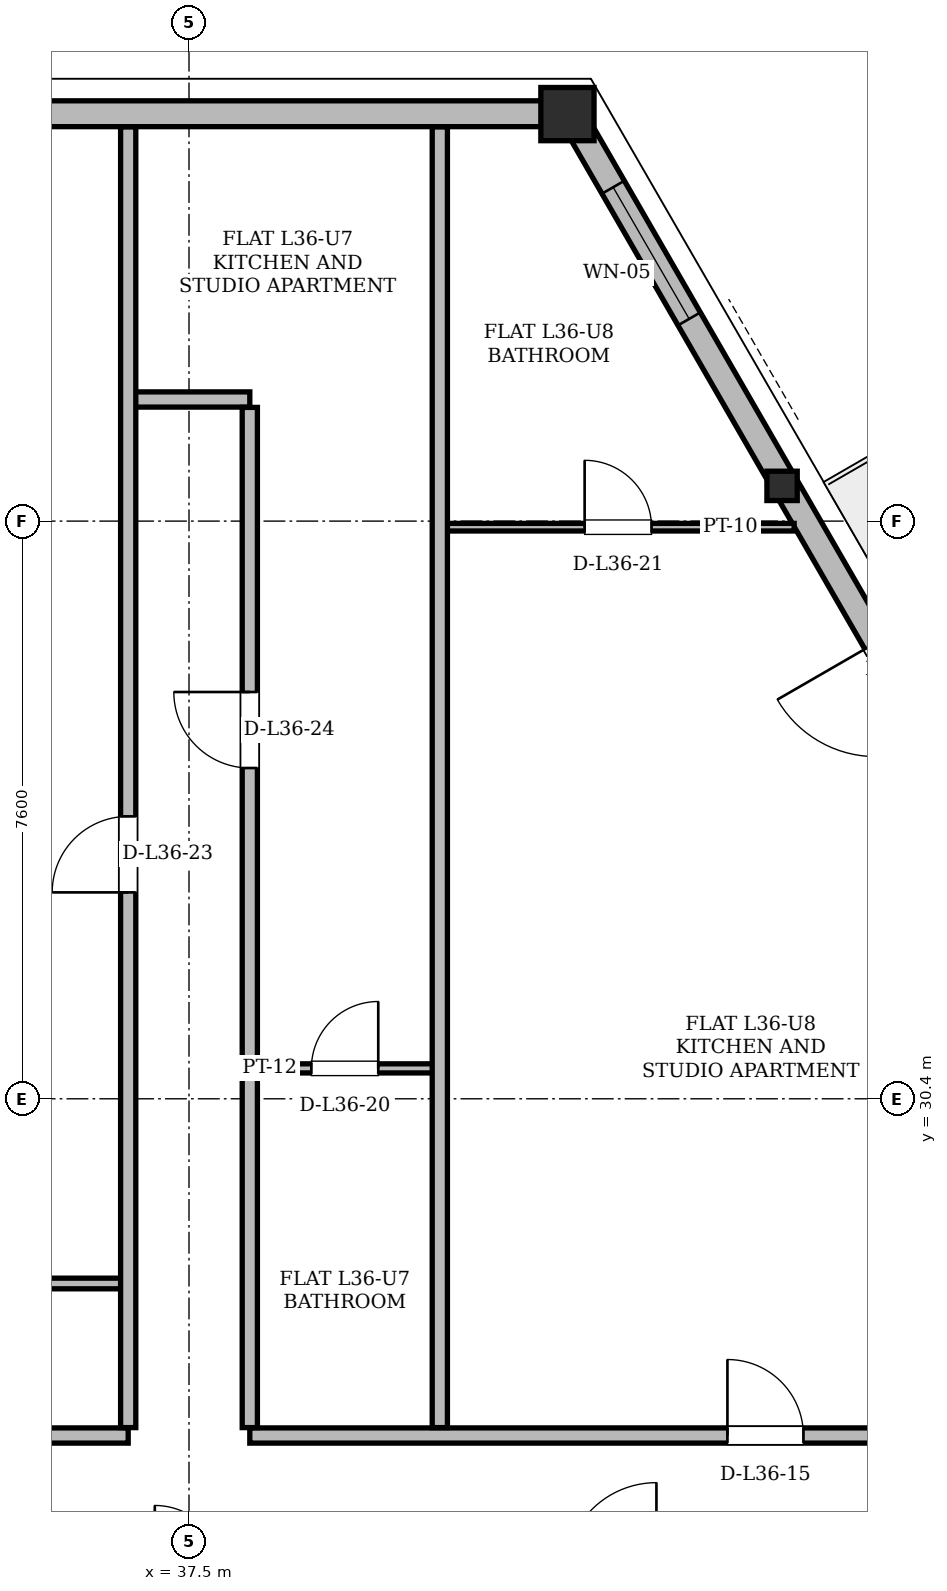
"""IFC4 building model, lengths in metres.
Left out: names, types, materials, properties, quantities, classifications, styles, units other than length and angle.
Written with IfcOpenShell. Run it as: python <this file> out.ifc"""

import sys

from ifc_helpers import new_model, si_unit, direction, frame, frame_2d, origin, origin_2d, place, context, subcontext, project, spatial, rectangle, hollow_rectangle, i_section, extrude, element, fill, save


model = new_model("IFC4")
c1 = context("Model", 3, precision=1e-05, world=origin(), true_north=direction((0.0, 1.0)))
c2 = subcontext(c1, "Body", "Model", "MODEL_VIEW")
j1 = project(units=[si_unit("LENGTHUNIT", "METRE"), si_unit("PLANEANGLEUNIT", "RADIAN")], contexts=[c1])
p1 = place(None, origin())
s1 = spatial("IfcSite", under=j1, at=p1, CompositionType="ELEMENT")
p2 = place(p1, origin())
s2 = spatial("IfcBuilding", under=s1, at=p2, CompositionType="ELEMENT")
p3 = place(p2, frame((0.0, 0.0, 138.6)))
s3 = spatial("IfcBuildingStorey", under=s2, at=p3, CompositionType="ELEMENT", Elevation=138.6)
p4 = place(p3, frame((42.522, 43.36, 0.004), z_axis=(-0.02405984636, -0.00265066104, 0.999707005972), x_axis=(0.109506935686, -0.99398603161, 0.0)))
e1 = element("IfcColumn", 1, at=p4, inside=s3, PredefinedType="COLUMN", context=c2, shape_type="SweptSolid", body=[
    extrude(hollow_rectangle(XDim=0.7, YDim=0.7, WallThickness=0.055, at=origin_2d()), origin(), (0.0, 0.0, 1.0), 3.592),
])
p5 = place(p3, frame((45.344, 38.473, 0.004), z_axis=(-0.022497217559, -0.005301459123, 0.999732849182), x_axis=(0.229367125794, -0.973339982537, 0.0)))
e2 = element("IfcColumn", 2, at=p5, inside=s3, PredefinedType="COLUMN", context=c2, shape_type="SweptSolid", body=[
    extrude(i_section(OverallWidth=0.399, OverallDepth=0.386, WebThickness=0.021, FlangeThickness=0.033, at=origin_2d()), origin(), (0.0, 0.0, 1.0), 3.592),
])
p6 = place(p3, frame((60.155, 12.82, 0.0), z_axis=(0.0, 0.0, 1.0), x_axis=(-0.499998325337, 0.86602637065, 0.0)))
e3 = element("IfcWall", 3, at=p6, inside=s3, PredefinedType="SOLIDWALL", context=c2, shape_type="SweptSolid", body=[
    extrude(rectangle(XDim=35.264, YDim=0.34, at=frame_2d((17.632, 0.0))), origin(), (0.0, 0.0, 1.0), 2.58),
])
p7 = place(p6, frame((6.579, 0.0, 0.0)))
e4 = element("IfcOpeningElement", 4, at=p7, cuts=e3, PredefinedType="OPENING", context=c2, shape_type="SweptSolid", body=[
    extrude(rectangle(XDim=1.5, YDim=2.2, at=frame_2d((0.75, 1.1))), frame((0.0, 0.17, 0.0), z_axis=(0.0, -1.0, 0.0), x_axis=(1.0, 0.0, 0.0)), (0.0, 0.0, 1.0), 0.34),
])
p8 = place(p6, frame((25.73, 0.0, 0.0)))
e5 = element("IfcOpeningElement", 5, at=p8, cuts=e3, PredefinedType="OPENING", context=c2, shape_type="SweptSolid", body=[
    extrude(rectangle(XDim=1.5, YDim=2.2, at=frame_2d((0.75, 1.1))), frame((0.0, 0.17, 0.0), z_axis=(0.0, -1.0, 0.0), x_axis=(1.0, 0.0, 0.0)), (0.0, 0.0, 1.0), 0.34),
])
p9 = place(p6, frame((3.541, 0.0, 0.85)))
e6 = element("IfcOpeningElement", 6, at=p9, cuts=e3, PredefinedType="OPENING", context=c2, shape_type="SweptSolid", body=[
    extrude(rectangle(XDim=1.2, YDim=1.48, at=frame_2d((0.6, 0.74))), frame((0.0, 0.17, 0.0), z_axis=(0.0, -1.0, 0.0), x_axis=(1.0, 0.0, 0.0)), (0.0, 0.0, 1.0), 0.34),
])
p10 = place(p6, frame((11.719, 0.0, 0.85)))
e7 = element("IfcOpeningElement", 7, at=p10, cuts=e3, PredefinedType="OPENING", context=c2, shape_type="SweptSolid", body=[
    extrude(rectangle(XDim=1.2, YDim=1.48, at=frame_2d((0.6, 0.74))), frame((0.0, 0.17, 0.0), z_axis=(0.0, -1.0, 0.0), x_axis=(1.0, 0.0, 0.0)), (0.0, 0.0, 1.0), 0.34),
])
p11 = place(p6, frame((15.189, 0.0, 0.85)))
e8 = element("IfcOpeningElement", 8, at=p11, cuts=e3, PredefinedType="OPENING", context=c2, shape_type="SweptSolid", body=[
    extrude(rectangle(XDim=2.8, YDim=1.62, at=frame_2d((1.4, 0.81))), frame((0.0, 0.17, 0.0), z_axis=(0.0, -1.0, 0.0), x_axis=(1.0, 0.0, 0.0)), (0.0, 0.0, 1.0), 0.34),
])
p12 = place(p6, frame((32.147, 0.0, 0.85)))
e9 = element("IfcOpeningElement", 9, at=p12, cuts=e3, PredefinedType="OPENING", context=c2, shape_type="SweptSolid", body=[
    extrude(rectangle(XDim=2.0, YDim=1.62, at=frame_2d((1.0, 0.81))), frame((0.0, 0.17, 0.0), z_axis=(0.0, -1.0, 0.0), x_axis=(1.0, 0.0, 0.0)), (0.0, 0.0, 1.0), 0.34),
])
p13 = place(p3, frame((42.522, 43.36, 0.0), z_axis=(0.0, 0.0, 1.0), x_axis=(-1.0, 0.0, 0.0)))
e10 = element("IfcWall", 10, at=p13, inside=s3, PredefinedType="SOLIDWALL", context=c2, shape_type="SweptSolid", body=[
    extrude(rectangle(XDim=10.045, YDim=0.34, at=frame_2d((5.022, 0.0))), origin(), (0.0, 0.0, 1.0), 2.58),
])
p14 = place(p3, frame((27.55, 25.97, 0.0), z_axis=(0.0, 0.0, 1.0), x_axis=(1.0, 0.0, 0.0)))
e11 = element("IfcWall", 11, at=p14, inside=s3, PredefinedType="PARTITIONING", context=c2, shape_type="SweptSolid", body=[
    extrude(rectangle(XDim=9.15, YDim=0.2, at=frame_2d((4.575, 0.0))), origin(), (0.0, 0.0, 1.0), 2.822),
])
p15 = place(p3, frame((38.3, 25.97, 0.0), z_axis=(0.0, 0.0, 1.0), x_axis=(1.0, 0.0, 0.0)))
e12 = element("IfcWall", 12, at=p15, inside=s3, PredefinedType="PARTITIONING", context=c2, shape_type="SweptSolid", body=[
    extrude(rectangle(XDim=11.7, YDim=0.2, at=frame_2d((5.85, 0.0))), origin(), (0.0, 0.0, 1.0), 2.822),
])
p16 = place(p15, frame((6.284, 0.0, 0.0)))
e13 = element("IfcOpeningElement", 13, at=p16, cuts=e12, PredefinedType="OPENING", context=c2, shape_type="SweptSolid", body=[
    extrude(rectangle(XDim=1.0, YDim=2.18, at=frame_2d((0.5, 1.09))), frame((0.0, 0.1, 0.0), z_axis=(0.0, -1.0, 0.0), x_axis=(1.0, 0.0, 0.0)), (0.0, 0.0, 1.0), 0.2),
])
p17 = place(p3, frame((23.793, 27.97, 0.0), z_axis=(0.0, 0.0, 1.0), x_axis=(1.0, 0.0, 0.0)))
e14 = element("IfcWall", 14, at=p17, inside=s3, PredefinedType="PARTITIONING", context=c2, shape_type="SweptSolid", body=[
    extrude(rectangle(XDim=12.957, YDim=0.14, at=frame_2d((6.478, 0.0))), origin(), (0.0, 0.0, 1.0), 2.822),
])
p18 = place(p17, frame((0.529, 0.0, 0.0)))
e15 = element("IfcOpeningElement", 15, at=p18, cuts=e14, PredefinedType="OPENING", context=c2, shape_type="SweptSolid", body=[
    extrude(rectangle(XDim=0.88, YDim=2.08, at=frame_2d((0.44, 1.04))), frame((0.0, 0.07, 0.0), z_axis=(0.0, -1.0, 0.0), x_axis=(1.0, 0.0, 0.0)), (0.0, 0.0, 1.0), 0.14),
])
p19 = place(p17, frame((3.045, 0.0, 0.0)))
e16 = element("IfcOpeningElement", 16, at=p19, cuts=e14, PredefinedType="OPENING", context=c2, shape_type="SweptSolid", body=[
    extrude(rectangle(XDim=0.95, YDim=2.1, at=frame_2d((0.475, 1.05))), frame((0.0, 0.07, 0.0), z_axis=(0.0, -1.0, 0.0), x_axis=(1.0, 0.0, 0.0)), (0.0, 0.0, 1.0), 0.14),
])
p20 = place(p17, frame((6.227, 0.0, 0.0)))
e17 = element("IfcOpeningElement", 17, at=p20, cuts=e14, PredefinedType="OPENING", context=c2, shape_type="SweptSolid", body=[
    extrude(rectangle(XDim=0.95, YDim=2.1, at=frame_2d((0.475, 1.05))), frame((0.0, 0.07, 0.0), z_axis=(0.0, -1.0, 0.0), x_axis=(1.0, 0.0, 0.0)), (0.0, 0.0, 1.0), 0.14),
])
p21 = place(p17, frame((10.188, 0.0, 0.0)))
e18 = element("IfcOpeningElement", 18, at=p21, cuts=e14, PredefinedType="OPENING", context=c2, shape_type="SweptSolid", body=[
    extrude(rectangle(XDim=0.92, YDim=2.12, at=frame_2d((0.46, 1.06))), frame((0.0, 0.07, 0.0), z_axis=(0.0, -1.0, 0.0), x_axis=(1.0, 0.0, 0.0)), (0.0, 0.0, 1.0), 0.14),
])
p22 = place(p3, frame((38.218, 30.8, 0.0), z_axis=(0.0, 0.0, 1.0), x_axis=(1.0, 0.0, 0.0)))
e19 = element("IfcWall", 19, at=p22, inside=s3, PredefinedType="PARTITIONING", context=c2, shape_type="SweptSolid", body=[
    extrude(rectangle(XDim=2.664, YDim=0.12, at=frame_2d((1.332, 0.0))), origin(), (0.0, 0.0, 1.0), 3.36),
])
p23 = place(p22, frame((0.892, 0.0, 0.0)))
e20 = element("IfcOpeningElement", 20, at=p23, cuts=e19, PredefinedType="OPENING", context=c2, shape_type="SweptSolid", body=[
    extrude(rectangle(XDim=0.88, YDim=2.08, at=frame_2d((0.44, 1.04))), frame((0.0, 0.06, 0.0), z_axis=(0.0, -1.0, 0.0), x_axis=(1.0, 0.0, 0.0)), (0.0, 0.0, 1.0), 0.12),
])
p24 = place(p3, frame((40.718, 37.92, 0.0), z_axis=(0.0, 0.0, 1.0), x_axis=(1.0, 0.0, 0.0)))
e21 = element("IfcWall", 21, at=p24, inside=s3, PredefinedType="PARTITIONING", context=c2, shape_type="SweptSolid", body=[
    extrude(rectangle(XDim=4.744, YDim=0.1, at=frame_2d((2.372, 0.0))), origin(), (0.0, 0.0, 1.0), 3.36),
])
p25 = place(p24, frame((1.987, 0.0, 0.0)))
e22 = element("IfcOpeningElement", 22, at=p25, cuts=e21, PredefinedType="OPENING", context=c2, shape_type="SweptSolid", body=[
    extrude(rectangle(XDim=0.88, YDim=2.08, at=frame_2d((0.44, 1.04))), frame((0.0, 0.05, 0.0), z_axis=(0.0, -1.0, 0.0), x_axis=(1.0, 0.0, 0.0)), (0.0, 0.0, 1.0), 0.1),
])
p26 = place(p3, frame((36.7, 39.6, 0.0), z_axis=(0.0, 0.0, 1.0), x_axis=(1.0, 0.0, 0.0)))
e23 = element("IfcWall", 23, at=p26, inside=s3, PredefinedType="PARTITIONING", context=c2, shape_type="SweptSolid", body=[
    extrude(rectangle(XDim=1.6, YDim=0.2, at=frame_2d((0.8, 0.0))), origin(), (0.0, 0.0, 1.0), 3.36),
])
p27 = place(p3, frame((36.7, 26.074, 0.0), z_axis=(0.0, 0.0, 1.0), x_axis=(0.0, 1.0, 0.0)))
e24 = element("IfcWall", 24, at=p27, inside=s3, PredefinedType="PARTITIONING", context=c2, shape_type="SweptSolid", body=[
    extrude(rectangle(XDim=17.112, YDim=0.2, at=frame_2d((8.556, 0.0))), origin(), (0.0, 0.0, 1.0), 3.36),
])
p28 = place(p27, frame((7.042, 0.0, 0.0)))
e25 = element("IfcOpeningElement", 25, at=p28, cuts=e24, PredefinedType="OPENING", context=c2, shape_type="SweptSolid", body=[
    extrude(rectangle(XDim=1.0, YDim=2.18, at=frame_2d((0.5, 1.09))), frame((0.0, 0.1, 0.0), z_axis=(0.0, -1.0, 0.0), x_axis=(1.0, 0.0, 0.0)), (0.0, 0.0, 1.0), 0.2),
])
p29 = place(p3, frame((38.3, 26.074, 0.0), z_axis=(0.0, 0.0, 1.0), x_axis=(0.0, 1.0, 0.0)))
e26 = element("IfcWall", 26, at=p29, inside=s3, PredefinedType="PARTITIONING", context=c2, shape_type="SweptSolid", body=[
    extrude(rectangle(XDim=13.422, YDim=0.2, at=frame_2d((6.711, 0.0))), origin(), (0.0, 0.0, 1.0), 3.36),
])
p30 = place(p29, frame((8.678, 0.0, 0.0)))
e27 = element("IfcOpeningElement", 27, at=p30, cuts=e26, PredefinedType="OPENING", context=c2, shape_type="SweptSolid", body=[
    extrude(rectangle(XDim=1.0, YDim=2.18, at=frame_2d((0.5, 1.09))), frame((0.0, 0.1, 0.0), z_axis=(0.0, -1.0, 0.0), x_axis=(1.0, 0.0, 0.0)), (0.0, 0.0, 1.0), 0.2),
])
p31 = place(p3, frame((40.8, 26.074, 0.0), z_axis=(0.0, 0.0, 1.0), x_axis=(0.0, 1.0, 0.0)))
e28 = element("IfcWall", 28, at=p31, inside=s3, PredefinedType="PARTITIONING", context=c2, shape_type="SweptSolid", body=[
    extrude(rectangle(XDim=17.112, YDim=0.2, at=frame_2d((8.556, 0.0))), origin(), (0.0, 0.0, 1.0), 3.36),
])
p32 = place(p12, origin())
e29 = element("IfcWindow", 29, at=p32, inside=s3, PartitioningType="SINGLE_PANEL", PredefinedType="WINDOW", context=c2, shape_type="SweptSolid", body=[
    extrude(rectangle(XDim=2.0, YDim=1.62, at=frame_2d((1.0, 0.81))), frame((0.0, 0.03, 0.0), z_axis=(0.0, -1.0, 0.0), x_axis=(1.0, 0.0, 0.0)), (0.0, 0.0, 1.0), 0.06),
])
fill(e9, e29)
p33 = place(p16, origin())
e30 = element("IfcDoor", 30, at=p33, inside=s3, OperationType="SINGLE_SWING_LEFT", PredefinedType="DOOR", context=c2, shape_type="SweptSolid", body=[
    extrude(rectangle(XDim=1.0, YDim=2.18, at=frame_2d((0.5, 1.09))), frame((0.0, 0.025, 0.0), z_axis=(0.0, -1.0, 0.0), x_axis=(1.0, 0.0, 0.0)), (0.0, 0.0, 1.0), 0.05),
])
fill(e13, e30)
p34 = place(p23, origin())
e31 = element("IfcDoor", 31, at=p34, inside=s3, OperationType="SINGLE_SWING_RIGHT", PredefinedType="DOOR", context=c2, shape_type="SweptSolid", body=[
    extrude(rectangle(XDim=0.88, YDim=2.08, at=frame_2d((0.44, 1.04))), frame((0.0, 0.025, 0.0), z_axis=(0.0, -1.0, 0.0), x_axis=(1.0, 0.0, 0.0)), (0.0, 0.0, 1.0), 0.05),
])
fill(e20, e31)
p35 = place(p25, origin())
e32 = element("IfcDoor", 32, at=p35, inside=s3, OperationType="SINGLE_SWING_LEFT", PredefinedType="DOOR", context=c2, shape_type="SweptSolid", body=[
    extrude(rectangle(XDim=0.88, YDim=2.08, at=frame_2d((0.44, 1.04))), frame((0.0, 0.025, 0.0), z_axis=(0.0, -1.0, 0.0), x_axis=(1.0, 0.0, 0.0)), (0.0, 0.0, 1.0), 0.05),
])
fill(e22, e32)
p36 = place(p28, origin())
e33 = element("IfcDoor", 33, at=p36, inside=s3, OperationType="SINGLE_SWING_LEFT", PredefinedType="DOOR", context=c2, shape_type="SweptSolid", body=[
    extrude(rectangle(XDim=1.0, YDim=2.18, at=frame_2d((0.5, 1.09))), frame((0.0, 0.025, 0.0), z_axis=(0.0, -1.0, 0.0), x_axis=(1.0, 0.0, 0.0)), (0.0, 0.0, 1.0), 0.05),
])
fill(e25, e33)
p37 = place(p30, origin())
e34 = element("IfcDoor", 34, at=p37, inside=s3, OperationType="SINGLE_SWING_RIGHT", PredefinedType="DOOR", context=c2, shape_type="SweptSolid", body=[
    extrude(rectangle(XDim=1.0, YDim=2.18, at=frame_2d((0.5, 1.09))), frame((0.0, 0.025, 0.0), z_axis=(0.0, -1.0, 0.0), x_axis=(1.0, 0.0, 0.0)), (0.0, 0.0, 1.0), 0.05),
])
fill(e27, e34)
save(model, sys.argv[1])
